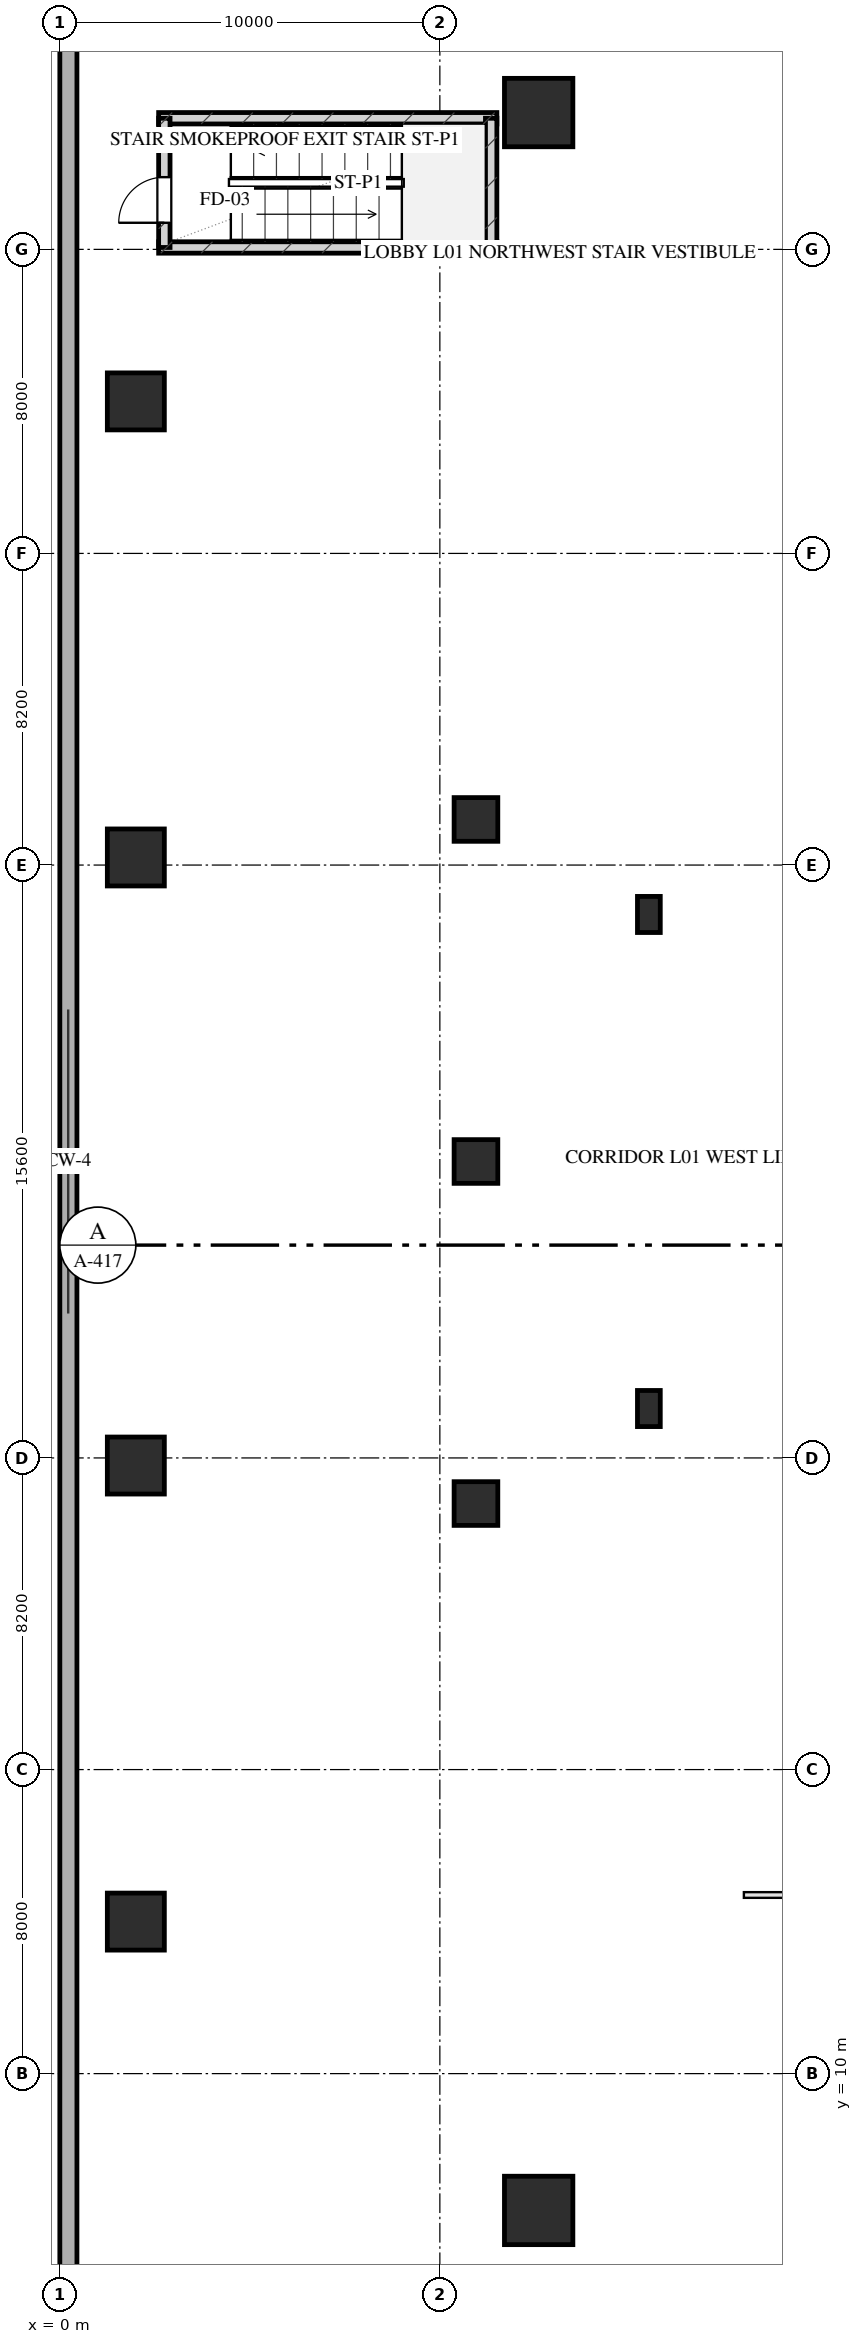
"""IFC4 building model, lengths in metres.
Left out: names, types, materials, properties, quantities, classifications, styles, units other than length and angle.
Written with IfcOpenShell. Run it as: python <this file> out.ifc"""

import sys

from ifc_helpers import new_model, si_unit, direction, frame, frame_2d, origin, origin_2d, place, context, subcontext, project, spatial, rectangle, hollow_rectangle, extrude, element, fill, save


model = new_model("IFC4")
c1 = context("Model", 3, precision=1e-05, world=origin(), true_north=direction((0.0, 1.0)))
c2 = subcontext(c1, "Body", "Model", "MODEL_VIEW")
j1 = project(units=[si_unit("LENGTHUNIT", "METRE"), si_unit("PLANEANGLEUNIT", "RADIAN")], contexts=[c1])
p1 = place(None, origin())
s1 = spatial("IfcSite", under=j1, at=p1, CompositionType="ELEMENT")
p2 = place(p1, origin())
s2 = spatial("IfcBuilding", under=s1, at=p2, CompositionType="ELEMENT")
p3 = place(p2, frame((0.0, 0.0, 6.0)))
s3 = spatial("IfcBuildingStorey", under=s2, at=p3, CompositionType="ELEMENT", Elevation=6.0)
for number, where, z_axis, x_axis in (
    (1, (2.6, 58.05, 0.0), (0.0, 0.0, 1.0), (1.0, 0.0, 0.0)),
    (2, (2.6, 61.45, 0.0), (0.0, 0.0, 1.0), (1.0, 0.0, 0.0)),
):
    element("IfcWall", number, at=place(p3, frame(where, z_axis=z_axis, x_axis=x_axis)), inside=s3, PredefinedType="SHEAR", context=c2, shape_type="SweptSolid", body=[
        extrude(rectangle(XDim=8.9, YDim=0.3, at=frame_2d((4.45, 0.0))), origin(), (0.0, 0.0, 1.0), 5.5),
    ])
p4 = place(p3, frame((11.35, 58.05, 0.0), z_axis=(0.0, 0.0, 1.0), x_axis=(0.0, 1.0, 0.0)))
e3 = element("IfcWall", 3, at=p4, inside=s3, PredefinedType="SHEAR", context=c2, shape_type="SweptSolid", body=[
    extrude(rectangle(XDim=3.4, YDim=0.3, at=frame_2d((1.7, 0.0))), origin(), (0.0, 0.0, 1.0), 5.5),
])
p5 = place(p3, frame((2.75, 58.05, 0.0), z_axis=(0.0, 0.0, 1.0), x_axis=(0.0, 1.0, 0.0)))
e4 = element("IfcWall", 4, at=p5, inside=s3, PredefinedType="SHEAR", context=c2, shape_type="SweptSolid", body=[
    extrude(rectangle(XDim=3.4, YDim=0.3, at=frame_2d((1.7, 0.0))), origin(), (0.0, 0.0, 1.0), 5.5),
])
p6 = place(p5, frame((0.65, 0.0, 0.0)))
e5 = element("IfcOpeningElement", 5, at=p6, cuts=e4, PredefinedType="OPENING", context=c2, shape_type="SweptSolid", body=[
    extrude(rectangle(XDim=1.2, YDim=2.05, at=frame_2d((0.6, 1.025))), frame((0.0, 0.16, 0.0), z_axis=(0.0, -1.0, 0.0), x_axis=(1.0, 0.0, 0.0)), (0.0, 0.0, 1.0), 0.32),
])
for number, where, z_axis, x_axis in (
    (6, (2.0, 14.0, 0.0), (0.0, 0.0, 1.0), (1.0, 0.0, 0.0)),
    (7, (2.0, 26.0, 0.0), (0.0, 0.0, 1.0), (1.0, 0.0, 0.0)),
    (8, (2.0, 42.0, 0.0), (0.0, 0.0, 1.0), (1.0, 0.0, 0.0)),
    (9, (2.0, 54.0, 0.0), (0.0, 0.0, 1.0), (1.0, 0.0, 0.0)),
):
    element("IfcColumn", number, at=place(p3, frame(where, z_axis=z_axis, x_axis=x_axis)), inside=s3, PredefinedType="COLUMN", context=c2, shape_type="SweptSolid", body=[
        extrude(rectangle(XDim=1.5, YDim=1.5, at=origin_2d()), origin(), (0.0, 0.0, 1.0), 5.501),
    ])
for number, where, z_axis, x_axis in (
    (10, (12.6, 6.4, 0.0), (0.0, 0.0, 1.0), (1.0, 0.0, 0.0)),
    (11, (12.6, 61.6, 0.0), (0.0, 0.0, 1.0), (1.0, 0.0, 0.0)),
):
    element("IfcColumn", number, at=place(p3, frame(where, z_axis=z_axis, x_axis=x_axis)), inside=s3, PredefinedType="COLUMN", context=c2, shape_type="SweptSolid", body=[
        extrude(hollow_rectangle(XDim=1.8, YDim=1.8, WallThickness=0.06, at=origin_2d()), origin(), (0.0, 0.0, 1.0), 5.501),
    ])
for number, where, z_axis, x_axis in (
    (12, (10.95, 25.0, 0.0), (0.0, 0.0, 1.0), (1.0, 0.0, 0.0)),
    (13, (10.95, 34.0, 0.0), (0.0, 0.0, 1.0), (1.0, 0.0, 0.0)),
    (14, (10.95, 43.0, 0.0), (0.0, 0.0, 1.0), (1.0, 0.0, 0.0)),
):
    element("IfcColumn", number, at=place(p3, frame(where, z_axis=z_axis, x_axis=x_axis)), inside=s3, PredefinedType="COLUMN", context=c2, shape_type="SweptSolid", body=[
        extrude(hollow_rectangle(XDim=1.15, YDim=1.15, WallThickness=0.04, at=origin_2d()), origin(), (0.0, 0.0, 1.0), 5.501),
    ])
for number, where, z_axis, x_axis in (
    (15, (15.5, 27.5, 0.0), (0.0, 0.0, 1.0), (1.0, 0.0, 0.0)),
    (16, (15.5, 40.5, 0.0), (0.0, 0.0, 1.0), (1.0, 0.0, 0.0)),
):
    element("IfcColumn", number, at=place(p3, frame(where, z_axis=z_axis, x_axis=x_axis)), inside=s3, PredefinedType="PILASTER", context=c2, shape_type="SweptSolid", body=[
        extrude(rectangle(XDim=0.6, YDim=0.95, at=origin_2d()), origin(), (0.0, 0.0, 1.0), 5.501),
    ])
p7 = place(p3, frame((0.225, 0.0, 0.0), z_axis=(0.0, 0.0, 1.0), x_axis=(0.0, 1.0, 0.0)))
e17 = element("IfcWall", 17, at=p7, inside=s3, PredefinedType="SOLIDWALL", context=c2, shape_type="SweptSolid", body=[
    extrude(rectangle(XDim=68.0, YDim=0.45, at=frame_2d((34.0, 0.0))), origin(), (0.0, 0.0, 1.0), 5.2),
])
p8 = place(p3, frame((18.0, 14.7, 0.0), z_axis=(0.0, 0.0, 1.0), x_axis=(1.0, 0.0, 0.0)))
e18 = element("IfcWall", 18, at=p8, inside=s3, PredefinedType="PARTITIONING", context=c2, shape_type="SweptSolid", body=[
    extrude(rectangle(XDim=88.2, YDim=0.15, at=frame_2d((44.1, 0.0))), origin(), (0.0, 0.0, 1.0), 2.325),
])
p9 = place(p8, frame((21.6, 0.0, 0.0)))
e19 = element("IfcOpeningElement", 19, at=p9, cuts=e18, PredefinedType="OPENING", context=c2, shape_type="SweptSolid", body=[
    extrude(rectangle(XDim=1.5, YDim=2.05, at=frame_2d((0.75, 1.025))), frame((0.0, 0.085, 0.0), z_axis=(0.0, -1.0, 0.0), x_axis=(1.0, 0.0, 0.0)), (0.0, 0.0, 1.0), 0.17),
])
p10 = place(p6, origin())
e20 = element("IfcDoor", 20, at=p10, inside=s3, OperationType="SINGLE_SWING_LEFT", PredefinedType="DOOR", context=c2, shape_type="SweptSolid", body=[
    extrude(rectangle(XDim=1.2, YDim=2.05, at=frame_2d((0.6, 1.025))), frame((0.0, 0.025, 0.0), z_axis=(0.0, -1.0, 0.0), x_axis=(1.0, 0.0, 0.0)), (0.0, 0.0, 1.0), 0.05),
])
fill(e5, e20)
save(model, sys.argv[1])
